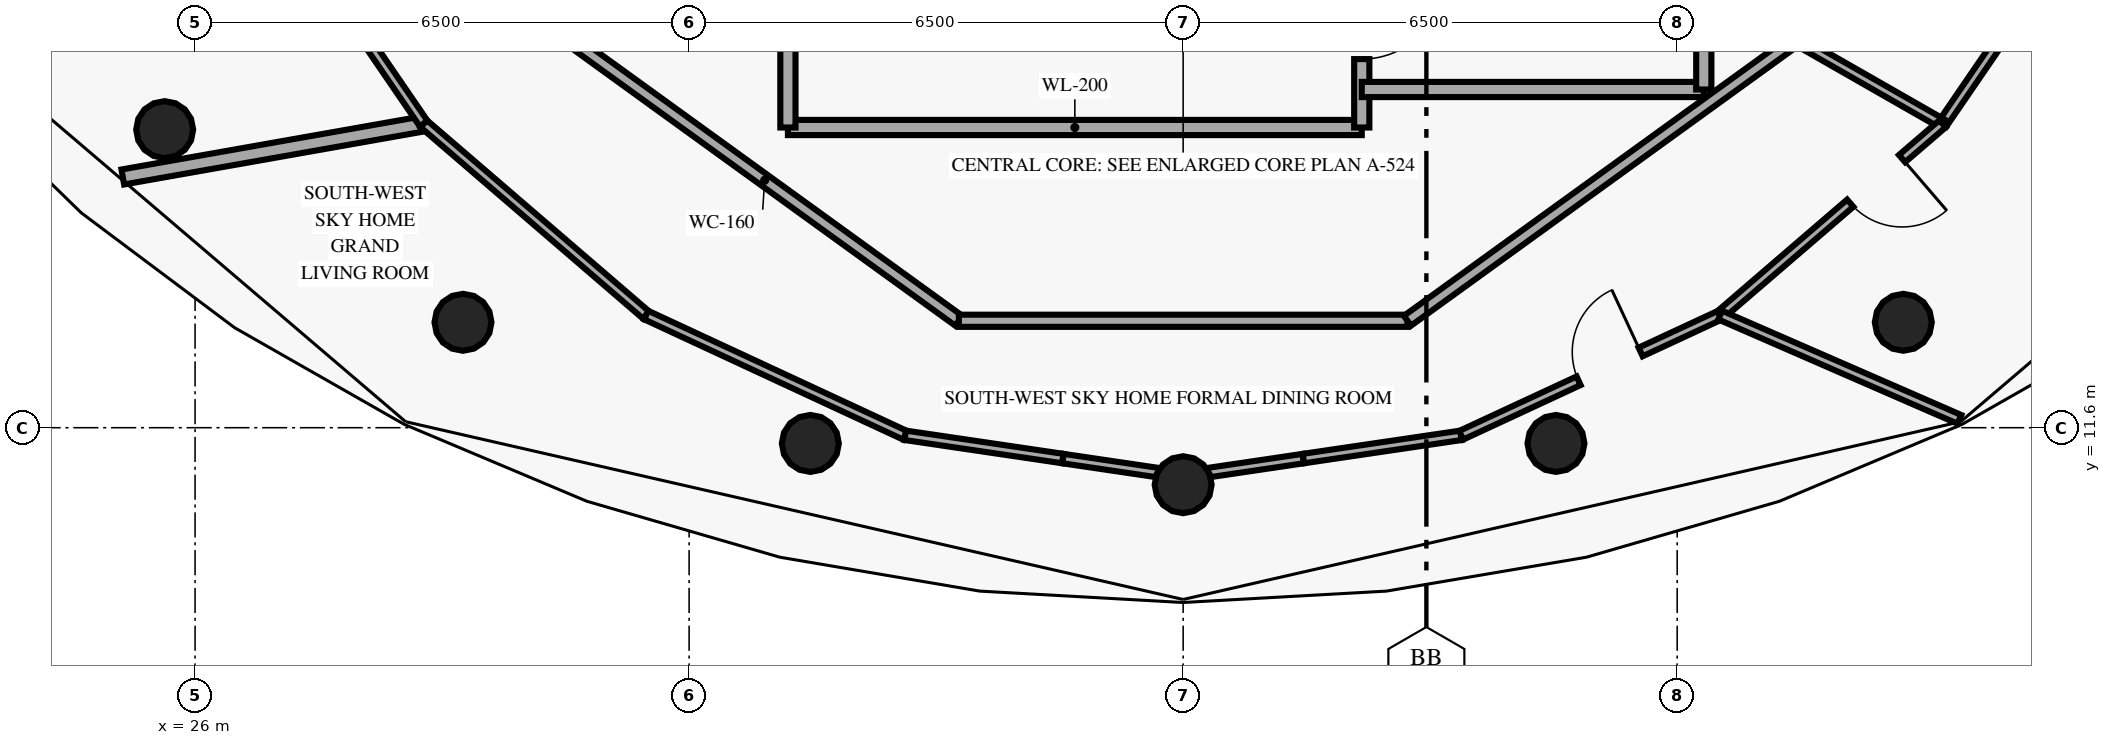
"""IFC4 building model, lengths in metres.
Left out: names, types, materials, properties, quantities, classifications, styles, units other than length and angle.
Written with IfcOpenShell. Run it as: python <this file> out.ifc"""

import sys

from ifc_helpers import new_model, si_unit, direction, frame, frame_2d, origin, origin_2d, place, context, subcontext, project, spatial, rectangle, circle, extrude, element, fill, save


model = new_model("IFC4")
c1 = context("Model", 3, precision=1e-05, world=origin(), true_north=direction((0.0, 1.0)))
c2 = subcontext(c1, "Body", "Model", "MODEL_VIEW")
j1 = project(units=[si_unit("LENGTHUNIT", "METRE"), si_unit("PLANEANGLEUNIT", "RADIAN")], contexts=[c1])
p1 = place(None, origin())
s1 = spatial("IfcSite", under=j1, at=p1, CompositionType="ELEMENT")
p2 = place(p1, origin())
s2 = spatial("IfcBuilding", under=s1, at=p2, CompositionType="ELEMENT")
p3 = place(p2, frame((0.0, 0.0, 255.6)))
s3 = spatial("IfcBuildingStorey", under=s2, at=p3, CompositionType="ELEMENT", Elevation=255.6)
for number, where, z_axis, x_axis in (
    (1, (25.6, 15.522, 0.0), (0.0, 0.0, 1.0), (1.0, 0.0, 0.0)),
    (2, (29.525, 12.987, 0.0), (0.0, 0.0, 1.0), (1.0, 0.0, 0.0)),
    (3, (34.095, 11.393, 0.0), (0.0, 0.0, 1.0), (1.0, 0.0, 0.0)),
    (4, (39.0, 10.85, 0.0), (0.0, 0.0, 1.0), (1.0, 0.0, 0.0)),
    (5, (43.905, 11.393, 0.0), (0.0, 0.0, 1.0), (1.0, 0.0, 0.0)),
    (6, (48.475, 12.987, 0.0), (0.0, 0.0, 1.0), (1.0, 0.0, 0.0)),
):
    element("IfcColumn", number, at=place(p3, frame(where, z_axis=z_axis, x_axis=x_axis)), inside=s3, PredefinedType="COLUMN", context=c2, shape_type="SweptSolid", body=[
        extrude(circle(Radius=0.375, at=origin_2d()), origin(), (0.0, 0.0, 1.0), 3.54),
    ])
p4 = place(p3, frame((33.8, 15.55, 0.0), z_axis=(0.0, 0.0, 1.0), x_axis=(1.0, 0.0, 0.0)))
e7 = element("IfcWall", 7, at=p4, inside=s3, PredefinedType="SOLIDWALL", context=c2, shape_type="SweptSolid", body=[
    extrude(rectangle(XDim=7.55, YDim=0.2, at=frame_2d((3.775, 0.0))), origin(), (0.0, 0.0, 1.0), 3.54),
])
p5 = place(p3, frame((33.8, 15.55, 0.0), z_axis=(0.0, 0.0, 1.0), x_axis=(0.0, 1.0, 0.0)))
e8 = element("IfcWall", 8, at=p5, inside=s3, PredefinedType="SOLIDWALL", context=c2, shape_type="SweptSolid", body=[
    extrude(rectangle(XDim=2.8, YDim=0.2, at=frame_2d((1.4, 0.0))), origin(), (0.0, 0.0, 1.0), 3.54),
])
p6 = place(p3, frame((41.35, 15.55, 0.0), z_axis=(0.0, 0.0, 1.0), x_axis=(0.0, 1.0, 0.0)))
e9 = element("IfcWall", 9, at=p6, inside=s3, PredefinedType="SOLIDWALL", context=c2, shape_type="SweptSolid", body=[
    extrude(rectangle(XDim=2.8, YDim=0.2, at=frame_2d((1.4, 0.0))), origin(), (0.0, 0.0, 1.0), 3.54),
])
p7 = place(p6, frame((0.9, 0.0, 0.0)))
e10 = element("IfcOpeningElement", 10, at=p7, cuts=e9, PredefinedType="OPENING", context=c2, shape_type="SweptSolid", body=[
    extrude(rectangle(XDim=1.1, YDim=2.15, at=frame_2d((0.55, 1.075))), frame((0.0, 0.11, 0.0), z_axis=(0.0, -1.0, 0.0), x_axis=(1.0, 0.0, 0.0)), (0.0, 0.0, 1.0), 0.22),
])
p8 = place(p3, frame((41.35, 16.05, 0.0), z_axis=(0.0, 0.0, 1.0), x_axis=(1.0, 0.0, 0.0)))
e11 = element("IfcWall", 11, at=p8, inside=s3, PredefinedType="SOLIDWALL", context=c2, shape_type="SweptSolid", body=[
    extrude(rectangle(XDim=4.5, YDim=0.2, at=frame_2d((2.25, 0.0))), origin(), (0.0, 0.0, 1.0), 3.54),
])
p9 = place(p3, frame((45.85, 16.05, 0.0), z_axis=(0.0, 0.0, 1.0), x_axis=(0.0, 1.0, 0.0)))
e12 = element("IfcWall", 12, at=p9, inside=s3, PredefinedType="SOLIDWALL", context=c2, shape_type="SweptSolid", body=[
    extrude(rectangle(XDim=2.3, YDim=0.2, at=frame_2d((1.15, 0.0))), origin(), (0.0, 0.0, 1.0), 3.54),
])
p10 = place(p3, frame((30.939, 16.703, 0.0), z_axis=(0.0, 0.0, 1.0), x_axis=(0.810290119061, -0.586028943784, 0.0)))
e13 = element("IfcWall", 13, at=p10, inside=s3, PredefinedType="PARTITIONING", context=c2, shape_type="SweptSolid", body=[
    extrude(rectangle(XDim=6.306, YDim=0.16, at=frame_2d((3.153, 0.0))), origin(), (0.0, 0.0, 1.0), 3.54),
])
p11 = place(p3, frame((36.049, 13.007, 0.0), z_axis=(0.0, 0.0, 1.0), x_axis=(1.0, 0.0, 0.0)))
e14 = element("IfcWall", 14, at=p11, inside=s3, PredefinedType="PARTITIONING", context=c2, shape_type="SweptSolid", body=[
    extrude(rectangle(XDim=5.902, YDim=0.16, at=frame_2d((2.951, 0.0))), origin(), (0.0, 0.0, 1.0), 3.54),
])
p12 = place(p3, frame((41.951, 13.007, 0.0), z_axis=(0.0, 0.0, 1.0), x_axis=(0.810290119061, 0.586028943784, 0.0)))
e15 = element("IfcWall", 15, at=p12, inside=s3, PredefinedType="PARTITIONING", context=c2, shape_type="SweptSolid", body=[
    extrude(rectangle(XDim=6.306, YDim=0.16, at=frame_2d((3.153, 0.0))), origin(), (0.0, 0.0, 1.0), 3.54),
])
p13 = place(p3, frame((29.009, 15.599, 0.0), z_axis=(0.0, 0.0, 1.0), x_axis=(-0.984724829426, -0.174117805844, 0.0)))
e16 = element("IfcWall", 16, at=p13, inside=s3, PredefinedType="PARTITIONING", context=c2, shape_type="SweptSolid", body=[
    extrude(rectangle(XDim=4.021, YDim=0.2, at=frame_2d((2.011, 0.0))), origin(), (0.0, 0.0, 1.0), 3.54),
])
p14 = place(p3, frame((26.763, 18.88, 0.0), z_axis=(0.0, 0.0, 1.0), x_axis=(0.5649172284, -0.825147577744, 0.0)))
e17 = element("IfcWall", 17, at=p14, inside=s3, PredefinedType="PARTITIONING", context=c2, shape_type="SweptSolid", body=[
    extrude(rectangle(XDim=3.976, YDim=0.125, at=frame_2d((1.988, 0.0))), origin(), (0.0, 0.0, 1.0), 3.54),
])
p15 = place(p3, frame((51.237, 18.88, 0.0), z_axis=(0.0, 0.0, 1.0), x_axis=(-0.5649172284, -0.825147577744, 0.0)))
e18 = element("IfcWall", 18, at=p15, inside=s3, PredefinedType="PARTITIONING", context=c2, shape_type="SweptSolid", body=[
    extrude(rectangle(XDim=3.976, YDim=0.125, at=frame_2d((1.988, 0.0))), origin(), (0.0, 0.0, 1.0), 3.54),
])
p16 = place(p15, frame((1.538, 0.0, 0.0)))
e19 = element("IfcOpeningElement", 19, at=p16, cuts=e18, PredefinedType="OPENING", context=c2, shape_type="SweptSolid", body=[
    extrude(rectangle(XDim=0.9, YDim=2.1, at=frame_2d((0.45, 1.05))), frame((0.0, 0.073, 0.0), z_axis=(0.0, -1.0, 0.0), x_axis=(1.0, 0.0, 0.0)), (0.0, 0.0, 1.0), 0.145),
])
p17 = place(p3, frame((47.061, 16.703, 0.0), z_axis=(0.0, 0.0, 1.0), x_axis=(0.868060627231, -0.496458203126, 0.0)))
e20 = element("IfcWall", 20, at=p17, inside=s3, PredefinedType="PARTITIONING", context=c2, shape_type="SweptSolid", body=[
    extrude(rectangle(XDim=2.223, YDim=0.125, at=frame_2d((1.112, 0.0))), origin(), (0.0, 0.0, 1.0), 3.54),
])
p18 = place(p3, frame((29.009, 15.599, 0.0), z_axis=(0.0, 0.0, 1.0), x_axis=(0.758094504626, -0.652144709444, 0.0)))
e21 = element("IfcWall", 21, at=p18, inside=s3, PredefinedType="PARTITIONING", context=c2, shape_type="SweptSolid", body=[
    extrude(rectangle(XDim=3.86, YDim=0.125, at=frame_2d((1.93, 0.0))), origin(), (0.0, 0.0, 1.0), 3.54),
])
p19 = place(p3, frame((31.935, 13.082, 0.0), z_axis=(0.0, 0.0, 1.0), x_axis=(0.907032898502, -0.421059759459, 0.0)))
e22 = element("IfcWall", 22, at=p19, inside=s3, PredefinedType="PARTITIONING", context=c2, shape_type="SweptSolid", body=[
    extrude(rectangle(XDim=3.757, YDim=0.125, at=frame_2d((1.879, 0.0))), origin(), (0.0, 0.0, 1.0), 3.54),
])
p20 = place(p3, frame((35.343, 11.5, 0.0), z_axis=(0.0, 0.0, 1.0), x_axis=(0.989306339285, -0.145852552432, 0.0)))
e23 = element("IfcWall", 23, at=p20, inside=s3, PredefinedType="PARTITIONING", context=c2, shape_type="SweptSolid", body=[
    extrude(rectangle(XDim=2.097, YDim=0.125, at=frame_2d((1.049, 0.0))), origin(), (0.0, 0.0, 1.0), 3.54),
])
for number, where, z_axis, x_axis in (
    (24, (37.418, 11.194, 0.0), (0.0, 0.0, 1.0), (0.989, -0.146, 0.0)),
    (25, (39.0, 10.96, 0.0), (0.0, 0.0, 1.0), (0.989, 0.146, 0.0)),
):
    element("IfcWall", number, at=place(p3, frame(where, z_axis=z_axis, x_axis=x_axis)), inside=s3, PredefinedType="PARTITIONING", context=c2, shape_type="SweptSolid", body=[
        extrude(rectangle(XDim=1.599, YDim=0.125, at=frame_2d((0.8, 0.0))), origin(), (0.0, 0.0, 1.0), 3.0),
    ])
p21 = place(p3, frame((40.582, 11.194, 0.0), z_axis=(0.0, 0.0, 1.0), x_axis=(0.989306339285, 0.145852552432, 0.0)))
e26 = element("IfcWall", 26, at=p21, inside=s3, PredefinedType="PARTITIONING", context=c2, shape_type="SweptSolid", body=[
    extrude(rectangle(XDim=2.097, YDim=0.125, at=frame_2d((1.049, 0.0))), origin(), (0.0, 0.0, 1.0), 3.54),
])
p22 = place(p3, frame((46.065, 13.082, 0.0), z_axis=(0.0, 0.0, 1.0), x_axis=(-0.907032898502, -0.421059759459, 0.0)))
e27 = element("IfcWall", 27, at=p22, inside=s3, PredefinedType="PARTITIONING", context=c2, shape_type="SweptSolid", body=[
    extrude(rectangle(XDim=3.757, YDim=0.125, at=frame_2d((1.879, 0.0))), origin(), (0.0, 0.0, 1.0), 3.54),
])
p23 = place(p22, frame((1.153, 0.0, 0.0)))
e28 = element("IfcOpeningElement", 28, at=p23, cuts=e27, PredefinedType="OPENING", context=c2, shape_type="SweptSolid", body=[
    extrude(rectangle(XDim=0.9, YDim=2.1, at=frame_2d((0.45, 1.05))), frame((0.0, 0.073, 0.0), z_axis=(0.0, -1.0, 0.0), x_axis=(1.0, 0.0, 0.0)), (0.0, 0.0, 1.0), 0.145),
])
p24 = place(p3, frame((48.991, 15.599, 0.0), z_axis=(0.0, 0.0, 1.0), x_axis=(-0.758094504626, -0.652144709444, 0.0)))
e29 = element("IfcWall", 29, at=p24, inside=s3, PredefinedType="PARTITIONING", context=c2, shape_type="SweptSolid", body=[
    extrude(rectangle(XDim=3.86, YDim=0.125, at=frame_2d((1.93, 0.0))), origin(), (0.0, 0.0, 1.0), 3.54),
])
p25 = place(p24, frame((0.702, 0.0, 0.0)))
e30 = element("IfcOpeningElement", 30, at=p25, cuts=e29, PredefinedType="OPENING", context=c2, shape_type="SweptSolid", body=[
    extrude(rectangle(XDim=0.9, YDim=2.1, at=frame_2d((0.45, 1.05))), frame((0.0, 0.073, 0.0), z_axis=(0.0, -1.0, 0.0), x_axis=(1.0, 0.0, 0.0)), (0.0, 0.0, 1.0), 0.145),
])
p26 = place(p3, frame((46.065, 13.082, 0.0), z_axis=(0.0, 0.0, 1.0), x_axis=(0.916707983788, -0.399557846199, 0.0)))
e31 = element("IfcWall", 31, at=p26, inside=s3, PredefinedType="PARTITIONING", context=c2, shape_type="SweptSolid", body=[
    extrude(rectangle(XDim=3.434, YDim=0.125, at=frame_2d((1.717, 0.0))), origin(), (0.0, 0.0, 1.0), 3.54),
])
p27 = place(p7, origin())
e32 = element("IfcDoor", 32, at=p27, inside=s3, OperationType="SINGLE_SWING_RIGHT", PredefinedType="DOOR", context=c2, shape_type="SweptSolid", body=[
    extrude(rectangle(XDim=1.1, YDim=2.15, at=frame_2d((0.55, 1.075))), frame((0.0, 0.025, 0.0), z_axis=(0.0, -1.0, 0.0), x_axis=(1.0, 0.0, 0.0)), (0.0, 0.0, 1.0), 0.05),
])
fill(e10, e32)
p28 = place(p23, origin())
e33 = element("IfcDoor", 33, at=p28, inside=s3, OperationType="SINGLE_SWING_LEFT", PredefinedType="DOOR", context=c2, shape_type="SweptSolid", body=[
    extrude(rectangle(XDim=0.9, YDim=2.1, at=frame_2d((0.45, 1.05))), frame((0.0, 0.025, 0.0), z_axis=(0.0, -1.0, 0.0), x_axis=(1.0, 0.0, 0.0)), (0.0, 0.0, 1.0), 0.05),
])
fill(e28, e33)
p29 = place(p25, origin())
e34 = element("IfcDoor", 34, at=p29, inside=s3, OperationType="SINGLE_SWING_LEFT", PredefinedType="DOOR", context=c2, shape_type="SweptSolid", body=[
    extrude(rectangle(XDim=0.9, YDim=2.1, at=frame_2d((0.45, 1.05))), frame((0.0, 0.025, 0.0), z_axis=(0.0, -1.0, 0.0), x_axis=(1.0, 0.0, 0.0)), (0.0, 0.0, 1.0), 0.05),
])
fill(e30, e34)
save(model, sys.argv[1])
